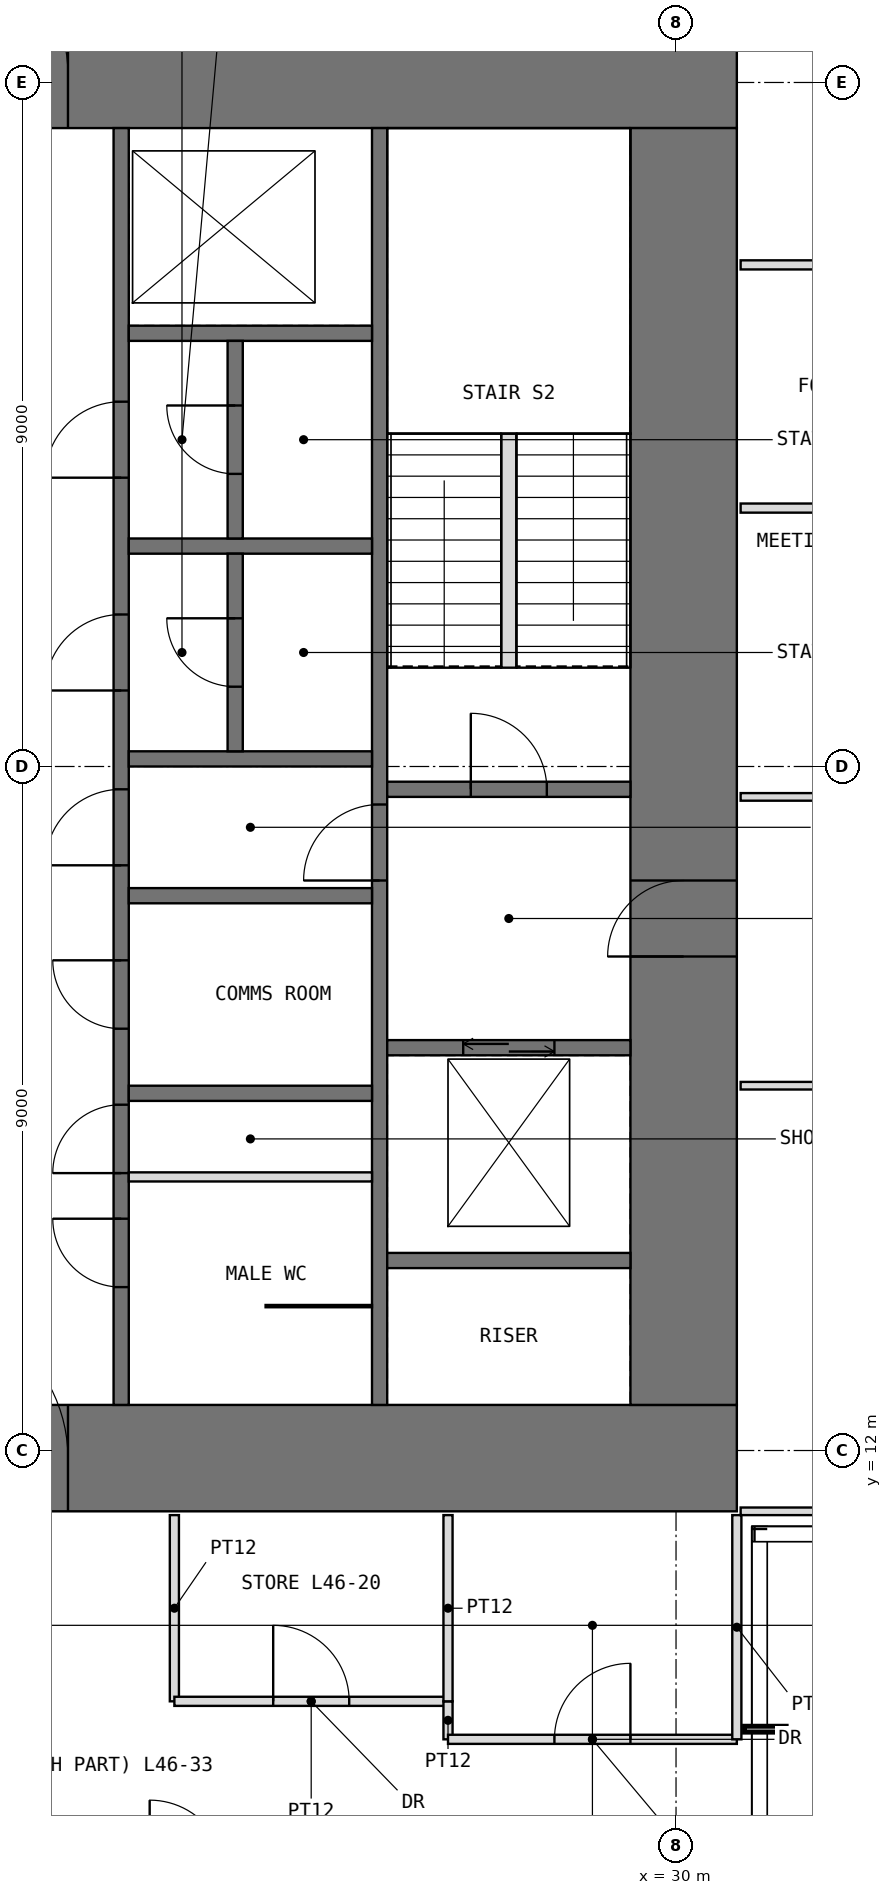
"""IFC4 building model, lengths in metres.
Left out: names, types, materials, properties, quantities, classifications, styles, units other than length and angle.
Written with IfcOpenShell. Run it as: python <this file> out.ifc"""

import sys

from ifc_helpers import new_model, si_unit, direction, frame, frame_2d, origin, place, context, subcontext, project, spatial, rectangle, extrude, element, fill, save


model = new_model("IFC4")
c1 = context("Model", 3, precision=1e-05, world=origin(), true_north=direction((0.0, 1.0)))
c2 = subcontext(c1, "Body", "Model", "MODEL_VIEW")
j1 = project(units=[si_unit("LENGTHUNIT", "METRE"), si_unit("PLANEANGLEUNIT", "RADIAN")], contexts=[c1])
p1 = place(None, origin())
s1 = spatial("IfcSite", under=j1, at=p1, CompositionType="ELEMENT")
p2 = place(p1, origin())
s2 = spatial("IfcBuilding", under=s1, at=p2, CompositionType="ELEMENT")
p3 = place(p2, frame((0.0, 0.0, 194.5)))
s3 = spatial("IfcBuildingStorey", under=s2, at=p3, CompositionType="ELEMENT", Elevation=194.5)
p4 = place(p3, frame((11.2, 11.9, -0.05), z_axis=(0.0, 0.0, 1.0), x_axis=(1.0, 0.0, 0.0)))
e1 = element("IfcWall", 1, at=p4, inside=s3, PredefinedType="SHEAR", context=c2, shape_type="SweptSolid", body=[
    extrude(rectangle(XDim=19.6, YDim=1.4, at=frame_2d((9.8, 0.0))), origin(), (0.0, 0.0, 1.0), 4.0),
])
p5 = place(p4, frame((8.8, 0.0, 0.05)))
e2 = element("IfcOpeningElement", 2, at=p5, cuts=e1, PredefinedType="OPENING", context=c2, shape_type="SweptSolid", body=[
    extrude(rectangle(XDim=2.0, YDim=2.2, at=frame_2d((1.0, 1.1))), frame((0.0, 0.71, 0.0), z_axis=(0.0, -1.0, 0.0), x_axis=(1.0, 0.0, 0.0)), (0.0, 0.0, 1.0), 1.42),
])
p6 = place(p3, frame((11.2, 30.1, -0.05), z_axis=(0.0, 0.0, 1.0), x_axis=(1.0, 0.0, 0.0)))
e3 = element("IfcWall", 3, at=p6, inside=s3, PredefinedType="SHEAR", context=c2, shape_type="SweptSolid", body=[
    extrude(rectangle(XDim=19.6, YDim=1.4, at=frame_2d((9.8, 0.0))), origin(), (0.0, 0.0, 1.0), 4.0),
])
p7 = place(p6, frame((8.8, 0.0, 0.05)))
e4 = element("IfcOpeningElement", 4, at=p7, cuts=e3, PredefinedType="OPENING", context=c2, shape_type="SweptSolid", body=[
    extrude(rectangle(XDim=2.0, YDim=2.2, at=frame_2d((1.0, 1.1))), frame((0.0, 0.71, 0.0), z_axis=(0.0, -1.0, 0.0), x_axis=(1.0, 0.0, 0.0)), (0.0, 0.0, 1.0), 1.42),
])
p8 = place(p3, frame((30.1, 12.6, -0.05), z_axis=(0.0, 0.0, 1.0), x_axis=(0.0, 1.0, 0.0)))
e5 = element("IfcWall", 5, at=p8, inside=s3, PredefinedType="SHEAR", context=c2, shape_type="SweptSolid", body=[
    extrude(rectangle(XDim=16.8, YDim=1.4, at=frame_2d((8.4, 0.0))), origin(), (0.0, 0.0, 1.0), 4.0),
])
p9 = place(p8, frame((5.9, 0.0, 0.05)))
e6 = element("IfcOpeningElement", 6, at=p9, cuts=e5, PredefinedType="OPENING", context=c2, shape_type="SweptSolid", body=[
    extrude(rectangle(XDim=1.0, YDim=2.2, at=frame_2d((0.5, 1.1))), frame((0.0, 0.71, 0.0), z_axis=(0.0, -1.0, 0.0), x_axis=(1.0, 0.0, 0.0)), (0.0, 0.0, 1.0), 1.42),
])
p10 = place(p3, frame((22.7, 12.6, -0.05), z_axis=(0.0, 0.0, 1.0), x_axis=(0.0, 1.0, 0.0)))
e7 = element("IfcWall", 7, at=p10, inside=s3, PredefinedType="SHEAR", context=c2, shape_type="SweptSolid", body=[
    extrude(rectangle(XDim=16.8, YDim=0.2, at=frame_2d((8.4, 0.0))), origin(), (0.0, 0.0, 1.0), 4.0),
])
p11 = place(p10, frame((3.05, 0.0, 0.05)))
e8 = element("IfcOpeningElement", 8, at=p11, cuts=e7, PredefinedType="OPENING", context=c2, shape_type="SweptSolid", body=[
    extrude(rectangle(XDim=0.9, YDim=2.2, at=frame_2d((0.45, 1.1))), frame((0.0, 0.11, 0.0), z_axis=(0.0, -1.0, 0.0), x_axis=(1.0, 0.0, 0.0)), (0.0, 0.0, 1.0), 0.22),
])
p12 = place(p10, frame((7.1, 0.0, 0.05)))
e9 = element("IfcOpeningElement", 9, at=p12, cuts=e7, PredefinedType="OPENING", context=c2, shape_type="SweptSolid", body=[
    extrude(rectangle(XDim=1.0, YDim=2.2, at=frame_2d((0.5, 1.1))), frame((0.0, 0.11, 0.0), z_axis=(0.0, -1.0, 0.0), x_axis=(1.0, 0.0, 0.0)), (0.0, 0.0, 1.0), 0.22),
])
p13 = place(p10, frame((1.55, 0.0, 0.05)))
e10 = element("IfcOpeningElement", 10, at=p13, cuts=e7, PredefinedType="OPENING", context=c2, shape_type="SweptSolid", body=[
    extrude(rectangle(XDim=0.9, YDim=2.2, at=frame_2d((0.45, 1.1))), frame((0.0, 0.11, 0.0), z_axis=(0.0, -1.0, 0.0), x_axis=(1.0, 0.0, 0.0)), (0.0, 0.0, 1.0), 0.22),
])
p14 = place(p10, frame((4.95, 0.0, 0.05)))
e11 = element("IfcOpeningElement", 11, at=p14, cuts=e7, PredefinedType="OPENING", context=c2, shape_type="SweptSolid", body=[
    extrude(rectangle(XDim=0.9, YDim=2.2, at=frame_2d((0.45, 1.1))), frame((0.0, 0.11, 0.0), z_axis=(0.0, -1.0, 0.0), x_axis=(1.0, 0.0, 0.0)), (0.0, 0.0, 1.0), 0.22),
])
p15 = place(p10, frame((9.4, 0.0, 0.05)))
e12 = element("IfcOpeningElement", 12, at=p15, cuts=e7, PredefinedType="OPENING", context=c2, shape_type="SweptSolid", body=[
    extrude(rectangle(XDim=1.0, YDim=2.2, at=frame_2d((0.5, 1.1))), frame((0.0, 0.11, 0.0), z_axis=(0.0, -1.0, 0.0), x_axis=(1.0, 0.0, 0.0)), (0.0, 0.0, 1.0), 0.22),
])
p16 = place(p10, frame((12.2, 0.0, 0.05)))
e13 = element("IfcOpeningElement", 13, at=p16, cuts=e7, PredefinedType="OPENING", context=c2, shape_type="SweptSolid", body=[
    extrude(rectangle(XDim=1.0, YDim=2.2, at=frame_2d((0.5, 1.1))), frame((0.0, 0.11, 0.0), z_axis=(0.0, -1.0, 0.0), x_axis=(1.0, 0.0, 0.0)), (0.0, 0.0, 1.0), 0.22),
])
p17 = place(p3, frame((26.1, 12.6, -0.05), z_axis=(0.0, 0.0, 1.0), x_axis=(0.0, 1.0, 0.0)))
e14 = element("IfcWall", 14, at=p17, inside=s3, PredefinedType="SHEAR", context=c2, shape_type="SweptSolid", body=[
    extrude(rectangle(XDim=16.8, YDim=0.2, at=frame_2d((8.4, 0.0))), origin(), (0.0, 0.0, 1.0), 4.0),
])
p18 = place(p17, frame((6.9, 0.0, 0.05)))
e15 = element("IfcOpeningElement", 15, at=p18, cuts=e14, PredefinedType="OPENING", context=c2, shape_type="SweptSolid", body=[
    extrude(rectangle(XDim=1.0, YDim=2.2, at=frame_2d((0.5, 1.1))), frame((0.0, 0.11, 0.0), z_axis=(0.0, -1.0, 0.0), x_axis=(1.0, 0.0, 0.0)), (0.0, 0.0, 1.0), 0.22),
])
for number, where, z_axis, x_axis in (
    (16, (22.8, 16.7, -0.05), (0.0, 0.0, 1.0), (1.0, 0.0, 0.0)),
    (17, (22.8, 19.3, -0.05), (0.0, 0.0, 1.0), (1.0, 0.0, 0.0)),
    (18, (22.8, 21.1, -0.05), (0.0, 0.0, 1.0), (1.0, 0.0, 0.0)),
    (19, (22.8, 23.9, -0.05), (0.0, 0.0, 1.0), (1.0, 0.0, 0.0)),
    (20, (22.8, 26.7, -0.05), (0.0, 0.0, 1.0), (1.0, 0.0, 0.0)),
    (21, (26.2, 14.5, -0.05), (0.0, 0.0, 1.0), (1.0, 0.0, 0.0)),
):
    element("IfcWall", number, at=place(p3, frame(where, z_axis=z_axis, x_axis=x_axis)), inside=s3, PredefinedType="SHEAR", context=c2, shape_type="SweptSolid", body=[
        extrude(rectangle(XDim=3.2, YDim=0.2, at=frame_2d((1.6, 0.0))), origin(), (0.0, 0.0, 1.0), 4.0),
    ])
p19 = place(p3, frame((26.2, 17.3, -0.05), z_axis=(0.0, 0.0, 1.0), x_axis=(1.0, 0.0, 0.0)))
e22 = element("IfcWall", 22, at=p19, inside=s3, PredefinedType="SHEAR", context=c2, shape_type="SweptSolid", body=[
    extrude(rectangle(XDim=3.2, YDim=0.2, at=frame_2d((1.6, 0.0))), origin(), (0.0, 0.0, 1.0), 4.0),
])
p20 = place(p19, frame((1.0, 0.0, 0.05)))
e23 = element("IfcOpeningElement", 23, at=p20, cuts=e22, PredefinedType="OPENING", context=c2, shape_type="SweptSolid", body=[
    extrude(rectangle(XDim=1.2, YDim=2.2, at=frame_2d((0.6, 1.1))), frame((0.0, 0.11, 0.0), z_axis=(0.0, -1.0, 0.0), x_axis=(1.0, 0.0, 0.0)), (0.0, 0.0, 1.0), 0.22),
])
p21 = place(p3, frame((26.2, 20.7, -0.05), z_axis=(0.0, 0.0, 1.0), x_axis=(1.0, 0.0, 0.0)))
e24 = element("IfcWall", 24, at=p21, inside=s3, PredefinedType="SHEAR", context=c2, shape_type="SweptSolid", body=[
    extrude(rectangle(XDim=3.2, YDim=0.2, at=frame_2d((1.6, 0.0))), origin(), (0.0, 0.0, 1.0), 4.0),
])
p22 = place(p21, frame((1.1, 0.0, 0.05)))
e25 = element("IfcOpeningElement", 25, at=p22, cuts=e24, PredefinedType="OPENING", context=c2, shape_type="SweptSolid", body=[
    extrude(rectangle(XDim=1.0, YDim=2.2, at=frame_2d((0.5, 1.1))), frame((0.0, 0.11, 0.0), z_axis=(0.0, -1.0, 0.0), x_axis=(1.0, 0.0, 0.0)), (0.0, 0.0, 1.0), 0.22),
])
p23 = place(p3, frame((22.8, 15.6, 0.0), z_axis=(0.0, 0.0, 1.0), x_axis=(1.0, 0.0, 0.0)))
e26 = element("IfcWall", 26, at=p23, inside=s3, PredefinedType="PARTITIONING", context=c2, shape_type="SweptSolid", body=[
    extrude(rectangle(XDim=3.2, YDim=0.12, at=frame_2d((1.6, 0.0))), origin(), (0.0, 0.0, 1.0), 3.75),
])
p24 = place(p3, frame((24.6, 13.9, 0.0), z_axis=(0.0, 0.0, 1.0), x_axis=(1.0, 0.0, 0.0)))
e27 = element("IfcWall", 27, at=p24, inside=s3, PredefinedType="PARTITIONING", context=c2, shape_type="SweptSolid", body=[
    extrude(rectangle(XDim=1.4, YDim=0.03, at=frame_2d((0.7, 0.0))), origin(), (0.0, 0.0, 1.0), 3.75),
])
p25 = place(p3, frame((24.2, 21.2, -0.05), z_axis=(0.0, 0.0, 1.0), x_axis=(0.0, 1.0, 0.0)))
e28 = element("IfcWall", 28, at=p25, inside=s3, PredefinedType="SHEAR", context=c2, shape_type="SweptSolid", body=[
    extrude(rectangle(XDim=2.6, YDim=0.2, at=frame_2d((1.3, 0.0))), origin(), (0.0, 0.0, 1.0), 4.0),
])
p26 = place(p25, frame((0.85, 0.0, 0.05)))
e29 = element("IfcOpeningElement", 29, at=p26, cuts=e28, PredefinedType="OPENING", context=c2, shape_type="SweptSolid", body=[
    extrude(rectangle(XDim=0.9, YDim=2.2, at=frame_2d((0.45, 1.1))), frame((0.0, 0.11, 0.0), z_axis=(0.0, -1.0, 0.0), x_axis=(1.0, 0.0, 0.0)), (0.0, 0.0, 1.0), 0.22),
])
p27 = place(p3, frame((24.2, 24.0, -0.05), z_axis=(0.0, 0.0, 1.0), x_axis=(0.0, 1.0, 0.0)))
e30 = element("IfcWall", 30, at=p27, inside=s3, PredefinedType="SHEAR", context=c2, shape_type="SweptSolid", body=[
    extrude(rectangle(XDim=2.6, YDim=0.2, at=frame_2d((1.3, 0.0))), origin(), (0.0, 0.0, 1.0), 4.0),
])
p28 = place(p27, frame((0.85, 0.0, 0.05)))
e31 = element("IfcOpeningElement", 31, at=p28, cuts=e30, PredefinedType="OPENING", context=c2, shape_type="SweptSolid", body=[
    extrude(rectangle(XDim=0.9, YDim=2.2, at=frame_2d((0.45, 1.1))), frame((0.0, 0.11, 0.0), z_axis=(0.0, -1.0, 0.0), x_axis=(1.0, 0.0, 0.0)), (0.0, 0.0, 1.0), 0.22),
])
p29 = place(p3, frame((23.4, 8.7, 0.0), z_axis=(0.0, 0.0, 1.0), x_axis=(0.0, 1.0, 0.0)))
e32 = element("IfcWall", 32, at=p29, inside=s3, PredefinedType="PARTITIONING", context=c2, shape_type="SweptSolid", body=[
    extrude(rectangle(XDim=2.45, YDim=0.12, at=frame_2d((1.225, 0.0))), origin(), (0.0, 0.0, 1.0), 3.75),
])
p30 = place(p3, frame((23.4, 8.7, 0.0), z_axis=(0.0, 0.0, 1.0), x_axis=(1.0, 0.0, 0.0)))
e33 = element("IfcWall", 33, at=p30, inside=s3, PredefinedType="PARTITIONING", context=c2, shape_type="SweptSolid", body=[
    extrude(rectangle(XDim=3.6, YDim=0.12, at=frame_2d((1.8, 0.0))), origin(), (0.0, 0.0, 1.0), 3.75),
])
p31 = place(p30, frame((1.3, 0.0, 0.0)))
e34 = element("IfcOpeningElement", 34, at=p31, cuts=e33, PredefinedType="OPENING", context=c2, shape_type="SweptSolid", body=[
    extrude(rectangle(XDim=1.0, YDim=2.2, at=frame_2d((0.5, 1.1))), frame((0.0, 0.07, 0.0), z_axis=(0.0, -1.0, 0.0), x_axis=(1.0, 0.0, 0.0)), (0.0, 0.0, 1.0), 0.14),
])
p32 = place(p3, frame((27.0, 8.2, 0.0), z_axis=(0.0, 0.0, 1.0), x_axis=(0.0, 1.0, 0.0)))
e35 = element("IfcWall", 35, at=p32, inside=s3, PredefinedType="PARTITIONING", context=c2, shape_type="SweptSolid", body=[
    extrude(rectangle(XDim=0.5, YDim=0.12, at=frame_2d((0.25, 0.0))), origin(), (0.0, 0.0, 1.0), 3.75),
])
p33 = place(p3, frame((27.0, 8.2, 0.0), z_axis=(0.0, 0.0, 1.0), x_axis=(1.0, 0.0, 0.0)))
e36 = element("IfcWall", 36, at=p33, inside=s3, PredefinedType="PARTITIONING", context=c2, shape_type="SweptSolid", body=[
    extrude(rectangle(XDim=3.8, YDim=0.12, at=frame_2d((1.9, 0.0))), origin(), (0.0, 0.0, 1.0), 3.75),
])
p34 = place(p33, frame((1.4, 0.0, 0.0)))
e37 = element("IfcOpeningElement", 37, at=p34, cuts=e36, PredefinedType="OPENING", context=c2, shape_type="SweptSolid", body=[
    extrude(rectangle(XDim=1.0, YDim=2.2, at=frame_2d((0.5, 1.1))), frame((0.0, 0.07, 0.0), z_axis=(0.0, -1.0, 0.0), x_axis=(1.0, 0.0, 0.0)), (0.0, 0.0, 1.0), 0.14),
])
p35 = place(p3, frame((27.0, 8.7, 0.0), z_axis=(0.0, 0.0, 1.0), x_axis=(0.0, 1.0, 0.0)))
e38 = element("IfcWall", 38, at=p35, inside=s3, PredefinedType="PARTITIONING", context=c2, shape_type="SweptSolid", body=[
    extrude(rectangle(XDim=2.45, YDim=0.12, at=frame_2d((1.225, 0.0))), origin(), (0.0, 0.0, 1.0), 3.75),
])
p36 = place(p3, frame((30.8, 8.2, 0.0), z_axis=(0.0, 0.0, 1.0), x_axis=(0.0, 1.0, 0.0)))
e39 = element("IfcWall", 39, at=p36, inside=s3, PredefinedType="PARTITIONING", context=c2, shape_type="SweptSolid", body=[
    extrude(rectangle(XDim=2.95, YDim=0.12, at=frame_2d((1.475, 0.0))), origin(), (0.0, 0.0, 1.0), 3.75),
])
for number, where, z_axis, x_axis in (
    (40, (30.85, 11.2, 0.0), (0.0, 0.0, 1.0), (1.0, 0.0, 0.0)),
    (41, (30.85, 16.8, 0.0), (0.0, 0.0, 1.0), (1.0, 0.0, 0.0)),
    (42, (30.85, 20.6, 0.0), (0.0, 0.0, 1.0), (1.0, 0.0, 0.0)),
):
    element("IfcWall", number, at=place(p3, frame(where, z_axis=z_axis, x_axis=x_axis)), inside=s3, PredefinedType="PARTITIONING", context=c2, shape_type="SweptSolid", body=[
        extrude(rectangle(XDim=4.75, YDim=0.1, at=frame_2d((2.375, 0.0))), origin(), (0.0, 0.0, 1.0), 3.75),
    ])
p37 = place(p3, frame((30.85, 24.4, 0.0), z_axis=(0.0, 0.0, 1.0), x_axis=(1.0, 0.0, 0.0)))
e43 = element("IfcWall", 43, at=p37, inside=s3, PredefinedType="PARTITIONING", context=c2, shape_type="SweptSolid", body=[
    extrude(rectangle(XDim=4.75, YDim=0.12, at=frame_2d((2.375, 0.0))), origin(), (0.0, 0.0, 1.0), 3.75),
])
p38 = place(p3, frame((30.85, 27.6, 0.0), z_axis=(0.0, 0.0, 1.0), x_axis=(1.0, 0.0, 0.0)))
e44 = element("IfcWall", 44, at=p38, inside=s3, PredefinedType="PARTITIONING", context=c2, shape_type="SweptSolid", body=[
    extrude(rectangle(XDim=4.25, YDim=0.12, at=frame_2d((2.125, 0.0))), origin(), (0.0, 0.0, 1.0), 3.75),
])
p39 = place(p3, frame((27.8, 22.3, 0.0), z_axis=(0.0, 0.0, 1.0), x_axis=(0.0, 1.0, 0.0)))
e45 = element("IfcWall", 45, at=p39, inside=s3, PredefinedType="PARTITIONING", context=c2, shape_type="SweptSolid", body=[
    extrude(rectangle(XDim=3.08, YDim=0.2, at=frame_2d((1.54, 0.0))), origin(), (0.0, 0.0, 1.0), 4.0),
])
p40 = place(p5, origin())
e46 = element("IfcDoor", 46, at=p40, inside=s3, OperationType="DOUBLE_DOOR_SINGLE_SWING", PredefinedType="DOOR", context=c2, shape_type="SweptSolid", body=[
    extrude(rectangle(XDim=2.0, YDim=2.2, at=frame_2d((1.0, 1.1))), frame((0.0, 0.025, 0.0), z_axis=(0.0, -1.0, 0.0), x_axis=(1.0, 0.0, 0.0)), (0.0, 0.0, 1.0), 0.05),
])
fill(e2, e46)
p41 = place(p7, origin())
e47 = element("IfcDoor", 47, at=p41, inside=s3, OperationType="DOUBLE_DOOR_SINGLE_SWING", PredefinedType="DOOR", context=c2, shape_type="SweptSolid", body=[
    extrude(rectangle(XDim=2.0, YDim=2.2, at=frame_2d((1.0, 1.1))), frame((0.0, 0.025, 0.0), z_axis=(0.0, -1.0, 0.0), x_axis=(1.0, 0.0, 0.0)), (0.0, 0.0, 1.0), 0.05),
])
fill(e4, e47)
p42 = place(p11, origin())
e48 = element("IfcDoor", 48, at=p42, inside=s3, OperationType="SINGLE_SWING_LEFT", PredefinedType="DOOR", context=c2, shape_type="SweptSolid", body=[
    extrude(rectangle(XDim=0.9, YDim=2.2, at=frame_2d((0.45, 1.1))), frame((0.0, 0.025, 0.0), z_axis=(0.0, -1.0, 0.0), x_axis=(1.0, 0.0, 0.0)), (0.0, 0.0, 1.0), 0.05),
])
fill(e8, e48)
p43 = place(p9, origin())
e49 = element("IfcDoor", 49, at=p43, inside=s3, OperationType="SINGLE_SWING_LEFT", PredefinedType="DOOR", context=c2, shape_type="SweptSolid", body=[
    extrude(rectangle(XDim=1.0, YDim=2.2, at=frame_2d((0.5, 1.1))), frame((0.0, 0.025, 0.0), z_axis=(0.0, -1.0, 0.0), x_axis=(1.0, 0.0, 0.0)), (0.0, 0.0, 1.0), 0.05),
])
fill(e6, e49)
p44 = place(p22, origin())
e50 = element("IfcDoor", 50, at=p44, inside=s3, OperationType="SINGLE_SWING_LEFT", PredefinedType="DOOR", context=c2, shape_type="SweptSolid", body=[
    extrude(rectangle(XDim=1.0, YDim=2.2, at=frame_2d((0.5, 1.1))), frame((0.0, 0.025, 0.0), z_axis=(0.0, -1.0, 0.0), x_axis=(1.0, 0.0, 0.0)), (0.0, 0.0, 1.0), 0.05),
])
fill(e25, e50)
p45 = place(p18, origin())
e51 = element("IfcDoor", 51, at=p45, inside=s3, OperationType="SINGLE_SWING_LEFT", PredefinedType="DOOR", context=c2, shape_type="SweptSolid", body=[
    extrude(rectangle(XDim=1.0, YDim=2.2, at=frame_2d((0.5, 1.1))), frame((0.0, 0.025, 0.0), z_axis=(0.0, -1.0, 0.0), x_axis=(1.0, 0.0, 0.0)), (0.0, 0.0, 1.0), 0.05),
])
fill(e15, e51)
p46 = place(p12, origin())
e52 = element("IfcDoor", 52, at=p46, inside=s3, OperationType="SINGLE_SWING_LEFT", PredefinedType="DOOR", context=c2, shape_type="SweptSolid", body=[
    extrude(rectangle(XDim=1.0, YDim=2.2, at=frame_2d((0.5, 1.1))), frame((0.0, 0.025, 0.0), z_axis=(0.0, -1.0, 0.0), x_axis=(1.0, 0.0, 0.0)), (0.0, 0.0, 1.0), 0.05),
])
fill(e9, e52)
p47 = place(p13, origin())
e53 = element("IfcDoor", 53, at=p47, inside=s3, OperationType="SINGLE_SWING_RIGHT", PredefinedType="DOOR", context=c2, shape_type="SweptSolid", body=[
    extrude(rectangle(XDim=0.9, YDim=2.2, at=frame_2d((0.45, 1.1))), frame((0.0, 0.025, 0.0), z_axis=(0.0, -1.0, 0.0), x_axis=(1.0, 0.0, 0.0)), (0.0, 0.0, 1.0), 0.05),
])
fill(e10, e53)
p48 = place(p14, origin())
e54 = element("IfcDoor", 54, at=p48, inside=s3, OperationType="SINGLE_SWING_RIGHT", PredefinedType="DOOR", context=c2, shape_type="SweptSolid", body=[
    extrude(rectangle(XDim=0.9, YDim=2.2, at=frame_2d((0.45, 1.1))), frame((0.0, 0.025, 0.0), z_axis=(0.0, -1.0, 0.0), x_axis=(1.0, 0.0, 0.0)), (0.0, 0.0, 1.0), 0.05),
])
fill(e11, e54)
p49 = place(p15, origin())
e55 = element("IfcDoor", 55, at=p49, inside=s3, OperationType="SINGLE_SWING_LEFT", PredefinedType="DOOR", context=c2, shape_type="SweptSolid", body=[
    extrude(rectangle(XDim=1.0, YDim=2.2, at=frame_2d((0.5, 1.1))), frame((0.0, 0.025, 0.0), z_axis=(0.0, -1.0, 0.0), x_axis=(1.0, 0.0, 0.0)), (0.0, 0.0, 1.0), 0.05),
])
fill(e12, e55)
p50 = place(p26, origin())
e56 = element("IfcDoor", 56, at=p50, inside=s3, OperationType="SINGLE_SWING_RIGHT", PredefinedType="DOOR", context=c2, shape_type="SweptSolid", body=[
    extrude(rectangle(XDim=0.9, YDim=2.2, at=frame_2d((0.45, 1.1))), frame((0.0, 0.025, 0.0), z_axis=(0.0, -1.0, 0.0), x_axis=(1.0, 0.0, 0.0)), (0.0, 0.0, 1.0), 0.05),
])
fill(e29, e56)
p51 = place(p16, origin())
e57 = element("IfcDoor", 57, at=p51, inside=s3, OperationType="SINGLE_SWING_LEFT", PredefinedType="DOOR", context=c2, shape_type="SweptSolid", body=[
    extrude(rectangle(XDim=1.0, YDim=2.2, at=frame_2d((0.5, 1.1))), frame((0.0, 0.025, 0.0), z_axis=(0.0, -1.0, 0.0), x_axis=(1.0, 0.0, 0.0)), (0.0, 0.0, 1.0), 0.05),
])
fill(e13, e57)
p52 = place(p28, origin())
e58 = element("IfcDoor", 58, at=p52, inside=s3, OperationType="SINGLE_SWING_RIGHT", PredefinedType="DOOR", context=c2, shape_type="SweptSolid", body=[
    extrude(rectangle(XDim=0.9, YDim=2.2, at=frame_2d((0.45, 1.1))), frame((0.0, 0.025, 0.0), z_axis=(0.0, -1.0, 0.0), x_axis=(1.0, 0.0, 0.0)), (0.0, 0.0, 1.0), 0.05),
])
fill(e31, e58)
p53 = place(p31, origin())
e59 = element("IfcDoor", 59, at=p53, inside=s3, OperationType="SINGLE_SWING_LEFT", PredefinedType="DOOR", context=c2, shape_type="SweptSolid", body=[
    extrude(rectangle(XDim=1.0, YDim=2.2, at=frame_2d((0.5, 1.1))), frame((0.0, 0.025, 0.0), z_axis=(0.0, -1.0, 0.0), x_axis=(1.0, 0.0, 0.0)), (0.0, 0.0, 1.0), 0.05),
])
fill(e34, e59)
p54 = place(p34, origin())
e60 = element("IfcDoor", 60, at=p54, inside=s3, OperationType="SINGLE_SWING_RIGHT", PredefinedType="DOOR", context=c2, shape_type="SweptSolid", body=[
    extrude(rectangle(XDim=1.0, YDim=2.2, at=frame_2d((0.5, 1.1))), frame((0.0, 0.025, 0.0), z_axis=(0.0, -1.0, 0.0), x_axis=(1.0, 0.0, 0.0)), (0.0, 0.0, 1.0), 0.05),
])
fill(e37, e60)
p55 = place(p20, origin())
e61 = element("IfcDoor", 61, at=p55, inside=s3, OperationType="DOUBLE_DOOR_SLIDING", PredefinedType="DOOR", context=c2, shape_type="SweptSolid", body=[
    extrude(rectangle(XDim=1.2, YDim=2.2, at=frame_2d((0.6, 1.1))), frame((0.0, 0.025, 0.0), z_axis=(0.0, -1.0, 0.0), x_axis=(1.0, 0.0, 0.0)), (0.0, 0.0, 1.0), 0.05),
])
fill(e23, e61)
save(model, sys.argv[1])
